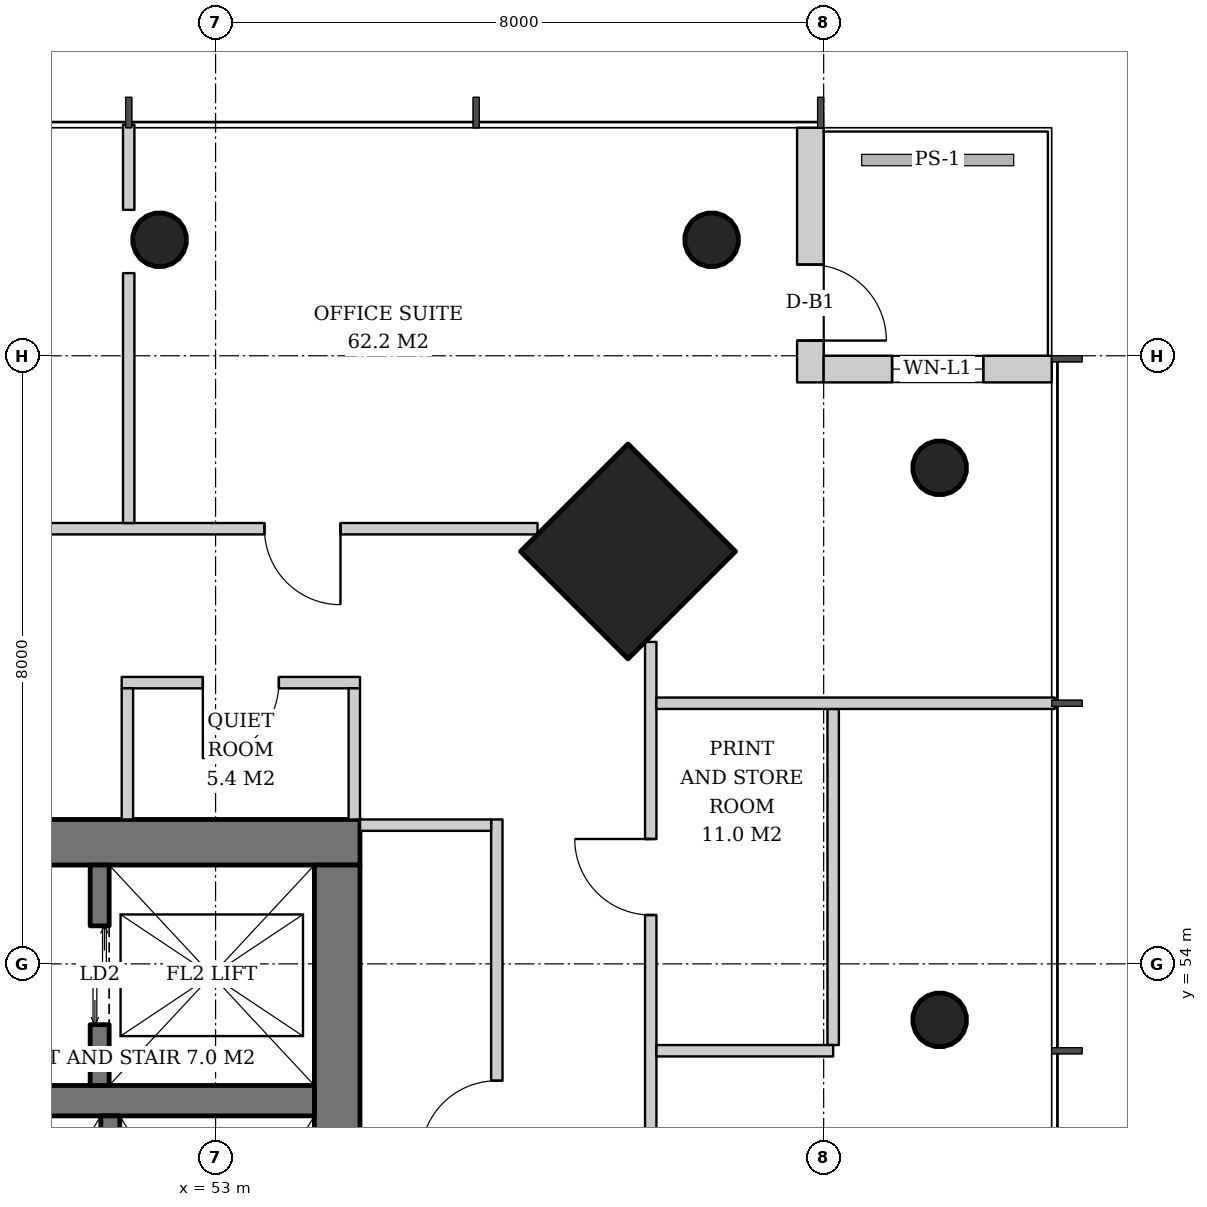
"""IFC4 building model, lengths in metres.
Left out: names, types, materials, properties, quantities, classifications, styles, units other than length and angle.
Written with IfcOpenShell. Run it as: python <this file> out.ifc"""

import sys

from ifc_helpers import new_model, si_unit, direction, frame, frame_2d, origin, origin_2d, place, context, subcontext, project, spatial, rectangle, hollow_circle, extrude, element, fill, save


model = new_model("IFC4")
c1 = context("Model", 3, precision=1e-05, world=origin(), true_north=direction((0.0, 1.0)))
c2 = subcontext(c1, "Body", "Model", "MODEL_VIEW")
j1 = project(units=[si_unit("LENGTHUNIT", "METRE"), si_unit("PLANEANGLEUNIT", "RADIAN")], contexts=[c1])
p1 = place(None, origin())
s1 = spatial("IfcSite", under=j1, at=p1, CompositionType="ELEMENT")
p2 = place(p1, origin())
s2 = spatial("IfcBuilding", under=s1, at=p2, CompositionType="ELEMENT")
p3 = place(p2, frame((0.0, 0.0, 222.4)))
s3 = spatial("IfcBuildingStorey", under=s2, at=p3, CompositionType="ELEMENT", Elevation=222.4)
p4 = place(p3, frame((58.464, 59.464, 0.0), z_axis=(-0.031962158256, -0.031962158256, 0.998977898093), x_axis=(0.707106781187, -0.707106781187, 0.0)))
e1 = element("IfcColumn", 1, at=p4, inside=s3, PredefinedType="COLUMN", context=c2, shape_type="SweptSolid", body=[
    extrude(rectangle(XDim=2.0, YDim=2.0, at=origin_2d()), origin(), (0.0, 0.0, 1.0), 3.804),
])
p5 = place(p3, frame((62.564, 60.564, 0.0), z_axis=(-0.031898107953, -0.031898107953, 0.998981992539), x_axis=(0.707106781187, -0.707106781187, 0.0)))
e2 = element("IfcColumn", 2, at=p5, inside=s3, PredefinedType="COLUMN", context=c2, shape_type="SweptSolid", body=[
    extrude(hollow_circle(Radius=0.355, WallThickness=0.025, at=origin_2d()), origin(), (0.0, 0.0, 1.0), 3.804),
])
p6 = place(p3, frame((62.564, 53.282, 0.0), z_axis=(-0.031910269556, -0.015987237665, 0.999362868496), x_axis=(0.447933021895, -0.894067115991, 0.0)))
e3 = element("IfcColumn", 3, at=p6, inside=s3, PredefinedType="COLUMN", context=c2, shape_type="SweptSolid", body=[
    extrude(hollow_circle(Radius=0.355, WallThickness=0.025, at=origin_2d()), origin(), (0.0, 0.0, 1.0), 3.802),
])
p7 = place(p3, frame((59.564, 63.564, 0.0), z_axis=(-0.031898107953, -0.031898107953, 0.998981992539), x_axis=(0.707106781187, -0.707106781187, 0.0)))
e4 = element("IfcColumn", 4, at=p7, inside=s3, PredefinedType="COLUMN", context=c2, shape_type="SweptSolid", body=[
    extrude(hollow_circle(Radius=0.355, WallThickness=0.025, at=origin_2d()), origin(), (0.0, 0.0, 1.0), 3.804),
])
p8 = place(p3, frame((52.282, 63.564, 0.0), z_axis=(-0.015987237665, -0.031910269556, 0.999362868496), x_axis=(0.894067115991, -0.447933021895, 0.0)))
e5 = element("IfcColumn", 5, at=p8, inside=s3, PredefinedType="COLUMN", context=c2, shape_type="SweptSolid", body=[
    extrude(hollow_circle(Radius=0.355, WallThickness=0.025, at=origin_2d()), origin(), (0.0, 0.0, 1.0), 3.802),
])
p9 = place(p3, frame((35.1, 55.6, 0.0), z_axis=(0.0, 0.0, 1.0), x_axis=(1.0, 0.0, 0.0)))
e6 = element("IfcWall", 6, at=p9, inside=s3, PredefinedType="SHEAR", context=c2, shape_type="SweptSolid", body=[
    extrude(rectangle(XDim=19.8, YDim=0.6, at=frame_2d((9.9, 0.0))), origin(), (0.0, 0.0, 1.0), 3.8),
])
p10 = place(p9, frame((14.54, 0.0, 0.0)))
e7 = element("IfcOpeningElement", 7, at=p10, cuts=e6, PredefinedType="OPENING", context=c2, shape_type="SweptSolid", body=[
    extrude(rectangle(XDim=1.0, YDim=2.1, at=frame_2d((0.5, 1.05))), frame((0.0, 0.31, 0.0), z_axis=(0.0, -1.0, 0.0), x_axis=(1.0, 0.0, 0.0)), (0.0, 0.0, 1.0), 0.62),
])
p11 = place(p9, frame((1.8, 0.0, 0.0)))
e8 = element("IfcOpeningElement", 8, at=p11, cuts=e6, PredefinedType="OPENING", context=c2, shape_type="SweptSolid", body=[
    extrude(rectangle(XDim=1.0, YDim=2.1, at=frame_2d((0.5, 1.05))), frame((0.0, 0.31, 0.0), z_axis=(0.0, -1.0, 0.0), x_axis=(1.0, 0.0, 0.0)), (0.0, 0.0, 1.0), 0.62),
])
p12 = place(p9, frame((3.913, 0.0, 0.0)))
e9 = element("IfcOpeningElement", 9, at=p12, cuts=e6, PredefinedType="OPENING", context=c2, shape_type="SweptSolid", body=[
    extrude(rectangle(XDim=1.0, YDim=2.1, at=frame_2d((0.5, 1.05))), frame((0.0, 0.31, 0.0), z_axis=(0.0, -1.0, 0.0), x_axis=(1.0, 0.0, 0.0)), (0.0, 0.0, 1.0), 0.62),
])
p13 = place(p3, frame((54.6, 36.7, 0.0), z_axis=(0.0, 0.0, 1.0), x_axis=(0.0, 1.0, 0.0)))
e10 = element("IfcWall", 10, at=p13, inside=s3, PredefinedType="SHEAR", context=c2, shape_type="SweptSolid", body=[
    extrude(rectangle(XDim=18.6, YDim=0.6, at=frame_2d((9.3, 0.0))), origin(), (0.0, 0.0, 1.0), 3.8),
])
p14 = place(p13, frame((8.4, 0.0, 0.0)))
e11 = element("IfcOpeningElement", 11, at=p14, cuts=e10, PredefinedType="OPENING", context=c2, shape_type="SweptSolid", body=[
    extrude(rectangle(XDim=1.8, YDim=2.4, at=frame_2d((0.9, 1.2))), frame((0.0, 0.31, 0.0), z_axis=(0.0, -1.0, 0.0), x_axis=(1.0, 0.0, 0.0)), (0.0, 0.0, 1.0), 0.62),
])
p15 = place(p3, frame((35.7, 52.2, 0.0), z_axis=(0.0, 0.0, 1.0), x_axis=(1.0, 0.0, 0.0)))
e12 = element("IfcWall", 12, at=p15, inside=s3, PredefinedType="SHEAR", context=c2, shape_type="SweptSolid", body=[
    extrude(rectangle(XDim=18.6, YDim=0.4, at=frame_2d((9.3, 0.0))), origin(), (0.0, 0.0, 1.0), 3.8),
])
p16 = place(p3, frame((60.825, 65.0, 0.0), z_axis=(0.0, 0.0, 1.0), x_axis=(0.0, -1.0, 0.0)))
e13 = element("IfcWall", 13, at=p16, inside=s3, PredefinedType="SOLIDWALL", context=c2, shape_type="SweptSolid", body=[
    extrude(rectangle(XDim=3.35, YDim=0.35, at=frame_2d((1.675, 0.0))), origin(), (0.0, 0.0, 1.0), 3.52),
])
p17 = place(p16, frame((1.8, 0.0, 0.0)))
e14 = element("IfcOpeningElement", 14, at=p17, cuts=e13, PredefinedType="OPENING", context=c2, shape_type="SweptSolid", body=[
    extrude(rectangle(XDim=1.0, YDim=2.4, at=frame_2d((0.5, 1.2))), frame((0.0, 0.185, 0.0), z_axis=(0.0, -1.0, 0.0), x_axis=(1.0, 0.0, 0.0)), (0.0, 0.0, 1.0), 0.37),
])
p18 = place(p3, frame((61.0, 61.825, 0.0), z_axis=(0.0, 0.0, 1.0), x_axis=(1.0, 0.0, 0.0)))
e15 = element("IfcWall", 15, at=p18, inside=s3, PredefinedType="SOLIDWALL", context=c2, shape_type="SweptSolid", body=[
    extrude(rectangle(XDim=3.0, YDim=0.35, at=frame_2d((1.5, 0.0))), origin(), (0.0, 0.0, 1.0), 3.52),
])
p19 = place(p18, frame((0.9, 0.0, 0.6)))
e16 = element("IfcOpeningElement", 16, at=p19, cuts=e15, PredefinedType="OPENING", context=c2, shape_type="SweptSolid", body=[
    extrude(rectangle(XDim=1.2, YDim=2.55, at=frame_2d((0.6, 1.275))), frame((0.0, 0.185, 0.0), z_axis=(0.0, -1.0, 0.0), x_axis=(1.0, 0.0, 0.0)), (0.0, 0.0, 1.0), 0.37),
])
p20 = place(p3, frame((51.475, 52.4, 0.0), z_axis=(0.0, 0.0, 1.0), x_axis=(0.0, 1.0, 0.0)))
e17 = element("IfcWall", 17, at=p20, inside=s3, PredefinedType="SHEAR", context=c2, shape_type="SweptSolid", body=[
    extrude(rectangle(XDim=2.9, YDim=0.25, at=frame_2d((1.45, 0.0))), origin(), (0.0, 0.0, 1.0), 3.8),
])
p21 = place(p20, frame((0.8, 0.0, 0.0)))
e18 = element("IfcOpeningElement", 18, at=p21, cuts=e17, PredefinedType="OPENING", context=c2, shape_type="SweptSolid", body=[
    extrude(rectangle(XDim=1.3, YDim=2.2, at=frame_2d((0.65, 1.1))), frame((0.0, 0.135, 0.0), z_axis=(0.0, -1.0, 0.0), x_axis=(1.0, 0.0, 0.0)), (0.0, 0.0, 1.0), 0.27),
])
p22 = place(p3, frame((51.615, 47.75, 0.0), z_axis=(0.0, 0.0, 1.0), x_axis=(0.0, 1.0, 0.0)))
e19 = element("IfcWall", 19, at=p22, inside=s3, PredefinedType="SHEAR", context=c2, shape_type="SweptSolid", body=[
    extrude(rectangle(XDim=4.25, YDim=0.25, at=frame_2d((2.125, 0.0))), origin(), (0.0, 0.0, 1.0), 3.8),
])
p23 = place(p3, frame((56.7, 48.025, 0.0), z_axis=(0.0, 0.0, 1.0), x_axis=(0.0, 1.0, 0.0)))
e20 = element("IfcWall", 20, at=p23, inside=s3, PredefinedType="PARTITIONING", context=c2, shape_type="SweptSolid", body=[
    extrude(rectangle(XDim=7.875, YDim=0.15, at=frame_2d((3.938, 0.0))), origin(), (0.0, 0.0, 1.0), 2.706),
])
p24 = place(p23, frame((3.438, 0.0, 0.0)))
e21 = element("IfcOpeningElement", 21, at=p24, cuts=e20, PredefinedType="OPENING", context=c2, shape_type="SweptSolid", body=[
    extrude(rectangle(XDim=1.0, YDim=2.1, at=frame_2d((0.5, 1.05))), frame((0.0, 0.085, 0.0), z_axis=(0.0, -1.0, 0.0), x_axis=(1.0, 0.0, 0.0)), (0.0, 0.0, 1.0), 0.17),
])
p25 = place(p3, frame((54.9, 55.825, 0.0), z_axis=(0.0, 0.0, 1.0), x_axis=(1.0, 0.0, 0.0)))
e22 = element("IfcWall", 22, at=p25, inside=s3, PredefinedType="PARTITIONING", context=c2, shape_type="SweptSolid", body=[
    extrude(rectangle(XDim=1.725, YDim=0.15, at=frame_2d((0.863, 0.0))), origin(), (0.0, 0.0, 1.0), 3.52),
])
p26 = place(p3, frame((54.9, 57.7, 0.0), z_axis=(0.0, 0.0, 1.0), x_axis=(-1.0, 0.0, 0.0)))
e23 = element("IfcWall", 23, at=p26, inside=s3, PredefinedType="PARTITIONING", context=c2, shape_type="SweptSolid", body=[
    extrude(rectangle(XDim=3.135, YDim=0.15, at=frame_2d((1.567, 0.0))), origin(), (0.0, 0.0, 1.0), 2.92),
])
p27 = place(p26, frame((1.067, 0.0, 0.0)))
e24 = element("IfcOpeningElement", 24, at=p27, cuts=e23, PredefinedType="OPENING", context=c2, shape_type="SweptSolid", body=[
    extrude(rectangle(XDim=1.0, YDim=2.1, at=frame_2d((0.5, 1.05))), frame((0.0, 0.085, 0.0), z_axis=(0.0, -1.0, 0.0), x_axis=(1.0, 0.0, 0.0)), (0.0, 0.0, 1.0), 0.17),
])
p28 = place(p3, frame((54.825, 55.9, 0.0), z_axis=(0.0, 0.0, 1.0), x_axis=(0.0, 1.0, 0.0)))
e25 = element("IfcWall", 25, at=p28, inside=s3, PredefinedType="PARTITIONING", context=c2, shape_type="SweptSolid", body=[
    extrude(rectangle(XDim=1.725, YDim=0.15, at=frame_2d((0.863, 0.0))), origin(), (0.0, 0.0, 1.0), 2.92),
])
p29 = place(p3, frame((51.84, 55.9, 0.0), z_axis=(0.0, 0.0, 1.0), x_axis=(0.0, 1.0, 0.0)))
e26 = element("IfcWall", 26, at=p29, inside=s3, PredefinedType="PARTITIONING", context=c2, shape_type="SweptSolid", body=[
    extrude(rectangle(XDim=1.725, YDim=0.15, at=frame_2d((0.863, 0.0))), origin(), (0.0, 0.0, 1.0), 3.52),
])
p30 = place(p3, frame((61.125, 52.932, 0.0), z_axis=(0.0, 0.0, 1.0), x_axis=(0.0, 1.0, 0.0)))
e27 = element("IfcWall", 27, at=p30, inside=s3, PredefinedType="PARTITIONING", context=c2, shape_type="SweptSolid", body=[
    extrude(rectangle(XDim=4.421, YDim=0.15, at=frame_2d((2.211, 0.0))), origin(), (0.0, 0.0, 1.0), 2.706),
])
p31 = place(p3, frame((58.725, 33.764, 0.0), z_axis=(0.0, 0.0, 1.0), x_axis=(0.0, 1.0, 0.0)))
e28 = element("IfcWall", 28, at=p31, inside=s3, PredefinedType="PARTITIONING", context=c2, shape_type="SweptSolid", body=[
    extrude(rectangle(XDim=24.472, YDim=0.15, at=frame_2d((12.236, 0.0))), origin(), (0.0, 0.0, 1.0), 2.706),
])
p32 = place(p31, frame((2.593, 0.0, 0.0)))
e29 = element("IfcOpeningElement", 29, at=p32, cuts=e28, PredefinedType="OPENING", context=c2, shape_type="SweptSolid", body=[
    extrude(rectangle(XDim=1.0, YDim=2.1, at=frame_2d((0.5, 1.05))), frame((0.0, 0.085, 0.0), z_axis=(0.0, -1.0, 0.0), x_axis=(1.0, 0.0, 0.0)), (0.0, 0.0, 1.0), 0.17),
])
p33 = place(p31, frame((7.164, 0.0, 0.0)))
e30 = element("IfcOpeningElement", 30, at=p33, cuts=e28, PredefinedType="OPENING", context=c2, shape_type="SweptSolid", body=[
    extrude(rectangle(XDim=1.0, YDim=2.1, at=frame_2d((0.5, 1.05))), frame((0.0, 0.085, 0.0), z_axis=(0.0, -1.0, 0.0), x_axis=(1.0, 0.0, 0.0)), (0.0, 0.0, 1.0), 0.17),
])
p34 = place(p31, frame((11.736, 0.0, 0.0)))
e31 = element("IfcOpeningElement", 31, at=p34, cuts=e28, PredefinedType="OPENING", context=c2, shape_type="SweptSolid", body=[
    extrude(rectangle(XDim=1.0, YDim=2.1, at=frame_2d((0.5, 1.05))), frame((0.0, 0.085, 0.0), z_axis=(0.0, -1.0, 0.0), x_axis=(1.0, 0.0, 0.0)), (0.0, 0.0, 1.0), 0.17),
])
p35 = place(p31, frame((20.879, 0.0, 0.0)))
e32 = element("IfcOpeningElement", 32, at=p35, cuts=e28, PredefinedType="OPENING", context=c2, shape_type="SweptSolid", body=[
    extrude(rectangle(XDim=1.0, YDim=2.1, at=frame_2d((0.5, 1.05))), frame((0.0, 0.085, 0.0), z_axis=(0.0, -1.0, 0.0), x_axis=(1.0, 0.0, 0.0)), (0.0, 0.0, 1.0), 0.17),
])
p36 = place(p3, frame((58.8, 52.857, 0.0), z_axis=(0.0, 0.0, 1.0), x_axis=(1.0, 0.0, 0.0)))
e33 = element("IfcWall", 33, at=p36, inside=s3, PredefinedType="PARTITIONING", context=c2, shape_type="SweptSolid", body=[
    extrude(rectangle(XDim=2.325, YDim=0.15, at=frame_2d((1.163, 0.0))), origin(), (0.0, 0.0, 1.0), 3.52),
])
p37 = place(p3, frame((58.8, 57.428, 0.0), z_axis=(0.0, 0.0, 1.0), x_axis=(1.0, 0.0, 0.0)))
e34 = element("IfcWall", 34, at=p37, inside=s3, PredefinedType="PARTITIONING", context=c2, shape_type="SweptSolid", body=[
    extrude(rectangle(XDim=5.24, YDim=0.15, at=frame_2d((2.62, 0.0))), origin(), (0.0, 0.0, 1.0), 3.52),
])
p38 = place(p3, frame((57.236, 59.725, 0.0), z_axis=(0.0, 0.0, 1.0), x_axis=(-1.0, 0.0, 0.0)))
e35 = element("IfcWall", 35, at=p38, inside=s3, PredefinedType="PARTITIONING", context=c2, shape_type="SweptSolid", body=[
    extrude(rectangle(XDim=24.472, YDim=0.15, at=frame_2d((12.236, 0.0))), origin(), (0.0, 0.0, 1.0), 2.706),
])
p39 = place(p38, frame((2.593, 0.0, 0.0)))
e36 = element("IfcOpeningElement", 36, at=p39, cuts=e35, PredefinedType="OPENING", context=c2, shape_type="SweptSolid", body=[
    extrude(rectangle(XDim=1.0, YDim=2.1, at=frame_2d((0.5, 1.05))), frame((0.0, 0.085, 0.0), z_axis=(0.0, -1.0, 0.0), x_axis=(1.0, 0.0, 0.0)), (0.0, 0.0, 1.0), 0.17),
])
p40 = place(p38, frame((7.164, 0.0, 0.0)))
e37 = element("IfcOpeningElement", 37, at=p40, cuts=e35, PredefinedType="OPENING", context=c2, shape_type="SweptSolid", body=[
    extrude(rectangle(XDim=1.0, YDim=2.1, at=frame_2d((0.5, 1.05))), frame((0.0, 0.085, 0.0), z_axis=(0.0, -1.0, 0.0), x_axis=(1.0, 0.0, 0.0)), (0.0, 0.0, 1.0), 0.17),
])
p41 = place(p38, frame((11.736, 0.0, 0.0)))
e38 = element("IfcOpeningElement", 38, at=p41, cuts=e35, PredefinedType="OPENING", context=c2, shape_type="SweptSolid", body=[
    extrude(rectangle(XDim=1.0, YDim=2.1, at=frame_2d((0.5, 1.05))), frame((0.0, 0.085, 0.0), z_axis=(0.0, -1.0, 0.0), x_axis=(1.0, 0.0, 0.0)), (0.0, 0.0, 1.0), 0.17),
])
p42 = place(p38, frame((16.307, 0.0, 0.0)))
e39 = element("IfcOpeningElement", 39, at=p42, cuts=e35, PredefinedType="OPENING", context=c2, shape_type="SweptSolid", body=[
    extrude(rectangle(XDim=1.0, YDim=2.1, at=frame_2d((0.5, 1.05))), frame((0.0, 0.085, 0.0), z_axis=(0.0, -1.0, 0.0), x_axis=(1.0, 0.0, 0.0)), (0.0, 0.0, 1.0), 0.17),
])
p43 = place(p38, frame((20.879, 0.0, 0.0)))
e40 = element("IfcOpeningElement", 40, at=p43, cuts=e35, PredefinedType="OPENING", context=c2, shape_type="SweptSolid", body=[
    extrude(rectangle(XDim=1.0, YDim=2.1, at=frame_2d((0.5, 1.05))), frame((0.0, 0.085, 0.0), z_axis=(0.0, -1.0, 0.0), x_axis=(1.0, 0.0, 0.0)), (0.0, 0.0, 1.0), 0.17),
])
p44 = place(p3, frame((51.857, 59.8, 0.0), z_axis=(0.0, 0.0, 1.0), x_axis=(0.0, 1.0, 0.0)))
e41 = element("IfcWall", 41, at=p44, inside=s3, PredefinedType="PARTITIONING", context=c2, shape_type="SweptSolid", body=[
    extrude(rectangle(XDim=3.287, YDim=0.15, at=frame_2d((1.644, 0.0))), origin(), (0.0, 0.0, 1.0), 3.52),
])
p45 = place(p3, frame((51.857, 63.92, 0.0), z_axis=(0.0, 0.0, 1.0), x_axis=(0.0, 1.0, 0.0)))
e42 = element("IfcWall", 42, at=p45, inside=s3, PredefinedType="PARTITIONING", context=c2, shape_type="SweptSolid", body=[
    extrude(rectangle(XDim=1.12, YDim=0.15, at=frame_2d((0.56, 0.0))), origin(), (0.0, 0.0, 1.0), 3.52),
])
p46 = place(p17, origin())
e43 = element("IfcDoor", 43, at=p46, inside=s3, OperationType="SINGLE_SWING_RIGHT", PredefinedType="DOOR", context=c2, shape_type="SweptSolid", body=[
    extrude(rectangle(XDim=1.0, YDim=2.4, at=frame_2d((0.5, 1.2))), frame((0.0, 0.025, 0.0), z_axis=(0.0, -1.0, 0.0), x_axis=(1.0, 0.0, 0.0)), (0.0, 0.0, 1.0), 0.05),
])
fill(e14, e43)
p47 = place(p19, origin())
e44 = element("IfcWindow", 44, at=p47, inside=s3, PartitioningType="SINGLE_PANEL", PredefinedType="WINDOW", context=c2, shape_type="SweptSolid", body=[
    extrude(rectangle(XDim=1.2, YDim=2.55, at=frame_2d((0.6, 1.275))), frame((0.0, 0.03, 0.0), z_axis=(0.0, -1.0, 0.0), x_axis=(1.0, 0.0, 0.0)), (0.0, 0.0, 1.0), 0.06),
])
fill(e16, e44)
p48 = place(p21, origin())
e45 = element("IfcDoor", 45, at=p48, inside=s3, OperationType="DOUBLE_DOOR_SLIDING", PredefinedType="DOOR", context=c2, shape_type="SweptSolid", body=[
    extrude(rectangle(XDim=1.3, YDim=2.2, at=frame_2d((0.65, 1.1))), frame((0.0, 0.025, 0.0), z_axis=(0.0, -1.0, 0.0), x_axis=(1.0, 0.0, 0.0)), (0.0, 0.0, 1.0), 0.05),
])
fill(e18, e45)
p49 = place(p24, origin())
e46 = element("IfcDoor", 46, at=p49, inside=s3, OperationType="SINGLE_SWING_LEFT", PredefinedType="DOOR", context=c2, shape_type="SweptSolid", body=[
    extrude(rectangle(XDim=1.0, YDim=2.1, at=frame_2d((0.5, 1.05))), frame((0.0, 0.025, 0.0), z_axis=(0.0, -1.0, 0.0), x_axis=(1.0, 0.0, 0.0)), (0.0, 0.0, 1.0), 0.05),
])
fill(e21, e46)
p50 = place(p27, origin())
e47 = element("IfcDoor", 47, at=p50, inside=s3, OperationType="SINGLE_SWING_RIGHT", PredefinedType="DOOR", context=c2, shape_type="SweptSolid", body=[
    extrude(rectangle(XDim=1.0, YDim=2.1, at=frame_2d((0.5, 1.05))), frame((0.0, 0.025, 0.0), z_axis=(0.0, -1.0, 0.0), x_axis=(1.0, 0.0, 0.0)), (0.0, 0.0, 1.0), 0.05),
])
fill(e24, e47)
p51 = place(p35, origin())
e48 = element("IfcDoor", 48, at=p51, inside=s3, OperationType="SINGLE_SWING_RIGHT", PredefinedType="DOOR", context=c2, shape_type="SweptSolid", body=[
    extrude(rectangle(XDim=1.0, YDim=2.1, at=frame_2d((0.5, 1.05))), frame((0.0, 0.025, 0.0), z_axis=(0.0, -1.0, 0.0), x_axis=(1.0, 0.0, 0.0)), (0.0, 0.0, 1.0), 0.05),
])
fill(e32, e48)
p52 = place(p39, origin())
e49 = element("IfcDoor", 49, at=p52, inside=s3, OperationType="SINGLE_SWING_LEFT", PredefinedType="DOOR", context=c2, shape_type="SweptSolid", body=[
    extrude(rectangle(XDim=1.0, YDim=2.1, at=frame_2d((0.5, 1.05))), frame((0.0, 0.025, 0.0), z_axis=(0.0, -1.0, 0.0), x_axis=(1.0, 0.0, 0.0)), (0.0, 0.0, 1.0), 0.05),
])
fill(e36, e49)
save(model, sys.argv[1])
